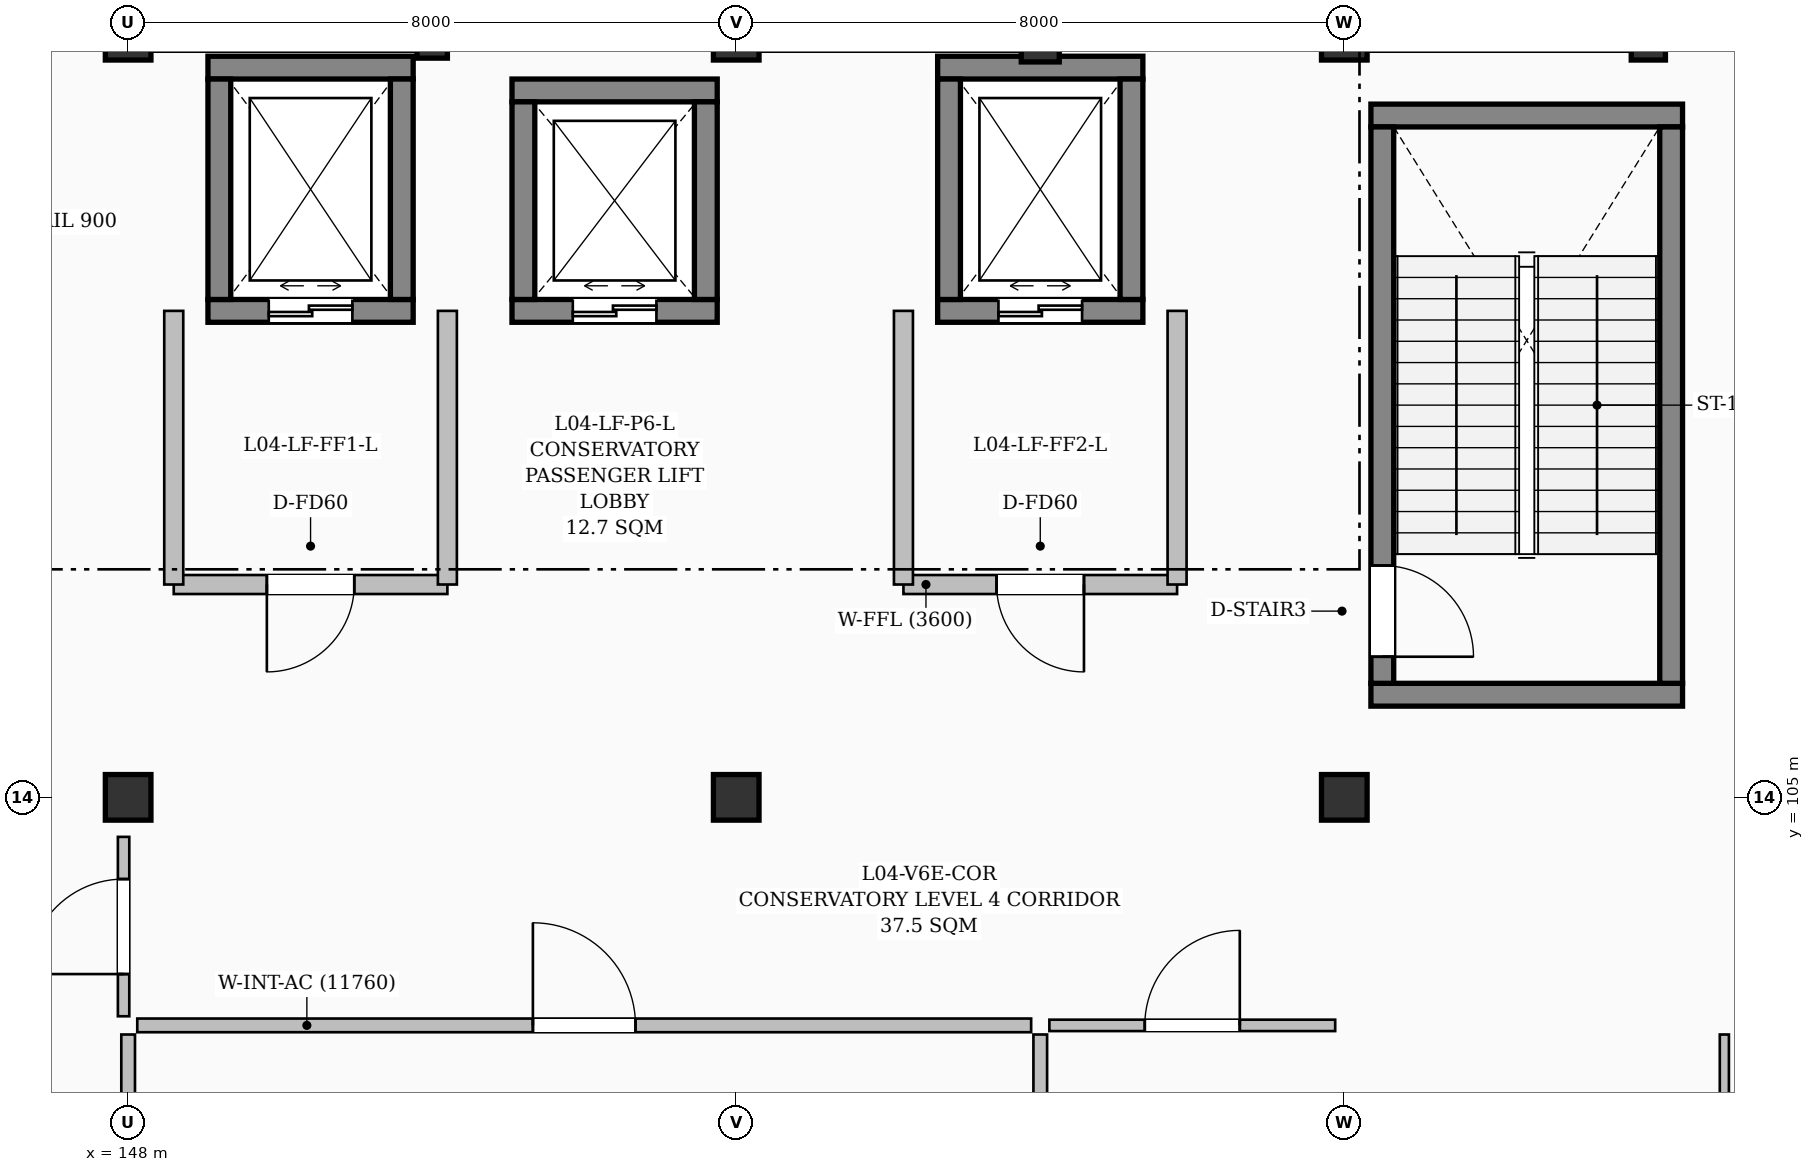
"""IFC4 building model, lengths in metres.
Left out: names, types, materials, properties, quantities, classifications, styles, units other than length and angle.
Written with IfcOpenShell. Run it as: python <this file> out.ifc"""

import sys

from ifc_helpers import new_model, si_unit, direction, frame, frame_2d, origin, origin_2d, place, context, subcontext, project, spatial, rectangle, extrude, element, fill, save


model = new_model("IFC4")
c1 = context("Model", 3, precision=1e-05, world=origin(), true_north=direction((0.0, 1.0)))
c2 = subcontext(c1, "Body", "Model", "MODEL_VIEW")
j1 = project(units=[si_unit("LENGTHUNIT", "METRE"), si_unit("PLANEANGLEUNIT", "RADIAN")], contexts=[c1])
p1 = place(None, origin())
s1 = spatial("IfcSite", under=j1, at=p1, CompositionType="ELEMENT")
p2 = place(p1, origin())
s2 = spatial("IfcBuilding", under=s1, at=p2, CompositionType="ELEMENT")
p3 = place(p2, frame((0.0, 0.0, 18.3)))
s3 = spatial("IfcBuildingStorey", under=s2, at=p3, CompositionType="ELEMENT", Elevation=18.3)
for number, where, z_axis, x_axis in (
    (1, (148.0, 105.0, 0.0), (0.0, 0.0, 1.0), (1.0, 0.0, 0.0)),
    (2, (148.0, 115.0, 0.0), (0.0, 0.0, 1.0), (1.0, 0.0, 0.0)),
):
    element("IfcColumn", number, at=place(p3, frame(where, z_axis=z_axis, x_axis=x_axis)), inside=s3, PredefinedType="COLUMN", context=c2, shape_type="SweptSolid", body=[
        extrude(rectangle(XDim=0.6, YDim=0.6, at=origin_2d()), origin(), (0.0, 0.0, 1.0), 4.5),
    ])
p4 = place(p3, frame((152.0, 115.0, 0.0), z_axis=(0.0, 0.0, 1.0), x_axis=(1.0, 0.0, 0.0)))
e3 = element("IfcColumn", 3, at=p4, inside=s3, PredefinedType="PILASTER", context=c2, shape_type="SweptSolid", body=[
    extrude(rectangle(XDim=0.4, YDim=0.55, at=origin_2d()), origin(), (0.0, 0.0, 1.0), 4.5),
])
for number, where, z_axis, x_axis in (
    (4, (156.0, 105.0, 0.0), (0.0, 0.0, 1.0), (1.0, 0.0, 0.0)),
    (5, (156.0, 115.0, 0.0), (0.0, 0.0, 1.0), (1.0, 0.0, 0.0)),
):
    element("IfcColumn", number, at=place(p3, frame(where, z_axis=z_axis, x_axis=x_axis)), inside=s3, PredefinedType="COLUMN", context=c2, shape_type="SweptSolid", body=[
        extrude(rectangle(XDim=0.6, YDim=0.6, at=origin_2d()), origin(), (0.0, 0.0, 1.0), 4.5),
    ])
p5 = place(p3, frame((160.0, 115.0, 0.0), z_axis=(0.0, 0.0, 1.0), x_axis=(1.0, 0.0, 0.0)))
e6 = element("IfcColumn", 6, at=p5, inside=s3, PredefinedType="PILASTER", context=c2, shape_type="SweptSolid", body=[
    extrude(rectangle(XDim=0.5, YDim=0.65, at=origin_2d()), origin(), (0.0, 0.0, 1.0), 4.5),
])
for number, where, z_axis, x_axis in (
    (7, (164.0, 105.0, 0.0), (0.0, 0.0, 1.0), (1.0, 0.0, 0.0)),
    (8, (164.0, 115.0, 0.0), (0.0, 0.0, 1.0), (1.0, 0.0, 0.0)),
):
    element("IfcColumn", number, at=place(p3, frame(where, z_axis=z_axis, x_axis=x_axis)), inside=s3, PredefinedType="COLUMN", context=c2, shape_type="SweptSolid", body=[
        extrude(rectangle(XDim=0.6, YDim=0.6, at=origin_2d()), origin(), (0.0, 0.0, 1.0), 4.5),
    ])
p6 = place(p3, frame((168.0, 115.0, 0.0), z_axis=(0.0, 0.0, 1.0), x_axis=(1.0, 0.0, 0.0)))
e9 = element("IfcColumn", 9, at=p6, inside=s3, PredefinedType="PILASTER", context=c2, shape_type="SweptSolid", body=[
    extrude(rectangle(XDim=0.45, YDim=0.6, at=origin_2d()), origin(), (0.0, 0.0, 1.0), 4.5),
])
for number, where, z_axis, x_axis in (
    (10, (164.35, 106.35, 0.0), (0.0, 0.0, 1.0), (1.0, 0.0, 0.0)),
    (11, (168.45, 113.97, 0.0), (0.0, 0.0, 1.0), (-1.0, 0.0, 0.0)),
):
    element("IfcWall", number, at=place(p3, frame(where, z_axis=z_axis, x_axis=x_axis)), inside=s3, PredefinedType="SHEAR", context=c2, shape_type="SweptSolid", body=[
        extrude(rectangle(XDim=4.1, YDim=0.3, at=frame_2d((2.05, 0.0))), origin(), (0.0, 0.0, 1.0), 4.2),
    ])
p7 = place(p3, frame((164.5, 113.82, 0.0), z_axis=(0.0, 0.0, 1.0), x_axis=(0.0, -1.0, 0.0)))
e12 = element("IfcWall", 12, at=p7, inside=s3, PredefinedType="SHEAR", context=c2, shape_type="SweptSolid", body=[
    extrude(rectangle(XDim=7.32, YDim=0.3, at=frame_2d((3.66, 0.0))), origin(), (0.0, 0.0, 1.0), 4.2),
])
p8 = place(p7, frame((5.77, 0.0, 0.0)))
e13 = element("IfcOpeningElement", 13, at=p8, cuts=e12, PredefinedType="OPENING", context=c2, shape_type="SweptSolid", body=[
    extrude(rectangle(XDim=1.2, YDim=2.15, at=frame_2d((0.6, 1.075))), frame((0.0, 0.16, 0.0), z_axis=(0.0, -1.0, 0.0), x_axis=(1.0, 0.0, 0.0)), (0.0, 0.0, 1.0), 0.32),
])
p9 = place(p3, frame((168.3, 113.82, 0.0), z_axis=(0.0, 0.0, 1.0), x_axis=(0.0, -1.0, 0.0)))
e14 = element("IfcWall", 14, at=p9, inside=s3, PredefinedType="SHEAR", context=c2, shape_type="SweptSolid", body=[
    extrude(rectangle(XDim=7.32, YDim=0.3, at=frame_2d((3.66, 0.0))), origin(), (0.0, 0.0, 1.0), 4.2),
])
p10 = place(p3, frame((149.05, 111.4, 0.0), z_axis=(0.0, 0.0, 1.0), x_axis=(1.0, 0.0, 0.0)))
e15 = element("IfcWall", 15, at=p10, inside=s3, PredefinedType="SHEAR", context=c2, shape_type="SweptSolid", body=[
    extrude(rectangle(XDim=2.7, YDim=0.3, at=frame_2d((1.35, 0.0))), origin(), (0.0, 0.0, 1.0), 4.2),
])
p11 = place(p10, frame((0.8, 0.0, 0.0)))
e16 = element("IfcOpeningElement", 16, at=p11, cuts=e15, PredefinedType="OPENING", context=c2, shape_type="SweptSolid", body=[
    extrude(rectangle(XDim=1.1, YDim=2.15, at=frame_2d((0.55, 1.075))), frame((0.0, 0.16, 0.0), z_axis=(0.0, -1.0, 0.0), x_axis=(1.0, 0.0, 0.0)), (0.0, 0.0, 1.0), 0.32),
])
p12 = place(p3, frame((151.75, 114.6, 0.0), z_axis=(0.0, 0.0, 1.0), x_axis=(-1.0, 0.0, 0.0)))
e17 = element("IfcWall", 17, at=p12, inside=s3, PredefinedType="SHEAR", context=c2, shape_type="SweptSolid", body=[
    extrude(rectangle(XDim=2.7, YDim=0.3, at=frame_2d((1.35, 0.0))), origin(), (0.0, 0.0, 1.0), 4.2),
])
for number, where, z_axis, x_axis in (
    (18, (149.2, 111.55, 0.0), (0.0, 0.0, 1.0), (0.0, 1.0, 0.0)),
    (19, (151.6, 114.45, 0.0), (0.0, 0.0, 1.0), (0.0, -1.0, 0.0)),
):
    element("IfcWall", number, at=place(p3, frame(where, z_axis=z_axis, x_axis=x_axis)), inside=s3, PredefinedType="SHEAR", context=c2, shape_type="SweptSolid", body=[
        extrude(rectangle(XDim=2.9, YDim=0.3, at=frame_2d((1.45, 0.0))), origin(), (0.0, 0.0, 1.0), 4.2),
    ])
p13 = place(p3, frame((152.2, 107.8, 0.0), z_axis=(0.0, 0.0, 1.0), x_axis=(-1.0, 0.0, 0.0)))
e20 = element("IfcWall", 20, at=p13, inside=s3, PredefinedType="SOLIDWALL", context=c2, shape_type="SweptSolid", body=[
    extrude(rectangle(XDim=3.6, YDim=0.25, at=frame_2d((1.8, 0.0))), origin(), (0.0, 0.0, 1.0), 4.2),
])
p14 = place(p13, frame((1.225, 0.0, 0.0)))
e21 = element("IfcOpeningElement", 21, at=p14, cuts=e20, PredefinedType="OPENING", context=c2, shape_type="SweptSolid", body=[
    extrude(rectangle(XDim=1.15, YDim=2.15, at=frame_2d((0.575, 1.075))), frame((0.0, 0.135, 0.0), z_axis=(0.0, -1.0, 0.0), x_axis=(1.0, 0.0, 0.0)), (0.0, 0.0, 1.0), 0.27),
])
for number, where, z_axis, x_axis in (
    (22, (148.6, 107.8, 0.0), (0.0, 0.0, 1.0), (0.0, 1.0, 0.0)),
    (23, (152.2, 111.4, 0.0), (0.0, 0.0, 1.0), (0.0, -1.0, 0.0)),
):
    element("IfcWall", number, at=place(p3, frame(where, z_axis=z_axis, x_axis=x_axis)), inside=s3, PredefinedType="SOLIDWALL", context=c2, shape_type="SweptSolid", body=[
        extrude(rectangle(XDim=3.6, YDim=0.25, at=frame_2d((1.8, 0.0))), origin(), (0.0, 0.0, 1.0), 4.2),
    ])
p15 = place(p3, frame((158.65, 111.4, 0.0), z_axis=(0.0, 0.0, 1.0), x_axis=(1.0, 0.0, 0.0)))
e24 = element("IfcWall", 24, at=p15, inside=s3, PredefinedType="SHEAR", context=c2, shape_type="SweptSolid", body=[
    extrude(rectangle(XDim=2.7, YDim=0.3, at=frame_2d((1.35, 0.0))), origin(), (0.0, 0.0, 1.0), 4.2),
])
p16 = place(p15, frame((0.8, 0.0, 0.0)))
e25 = element("IfcOpeningElement", 25, at=p16, cuts=e24, PredefinedType="OPENING", context=c2, shape_type="SweptSolid", body=[
    extrude(rectangle(XDim=1.1, YDim=2.15, at=frame_2d((0.55, 1.075))), frame((0.0, 0.16, 0.0), z_axis=(0.0, -1.0, 0.0), x_axis=(1.0, 0.0, 0.0)), (0.0, 0.0, 1.0), 0.32),
])
p17 = place(p3, frame((161.35, 114.6, 0.0), z_axis=(0.0, 0.0, 1.0), x_axis=(-1.0, 0.0, 0.0)))
e26 = element("IfcWall", 26, at=p17, inside=s3, PredefinedType="SHEAR", context=c2, shape_type="SweptSolid", body=[
    extrude(rectangle(XDim=2.7, YDim=0.3, at=frame_2d((1.35, 0.0))), origin(), (0.0, 0.0, 1.0), 4.2),
])
for number, where, z_axis, x_axis in (
    (27, (158.8, 111.55, 0.0), (0.0, 0.0, 1.0), (0.0, 1.0, 0.0)),
    (28, (161.2, 114.45, 0.0), (0.0, 0.0, 1.0), (0.0, -1.0, 0.0)),
):
    element("IfcWall", number, at=place(p3, frame(where, z_axis=z_axis, x_axis=x_axis)), inside=s3, PredefinedType="SHEAR", context=c2, shape_type="SweptSolid", body=[
        extrude(rectangle(XDim=2.9, YDim=0.3, at=frame_2d((1.45, 0.0))), origin(), (0.0, 0.0, 1.0), 4.2),
    ])
p18 = place(p3, frame((161.8, 107.8, 0.0), z_axis=(0.0, 0.0, 1.0), x_axis=(-1.0, 0.0, 0.0)))
e29 = element("IfcWall", 29, at=p18, inside=s3, PredefinedType="SOLIDWALL", context=c2, shape_type="SweptSolid", body=[
    extrude(rectangle(XDim=3.6, YDim=0.25, at=frame_2d((1.8, 0.0))), origin(), (0.0, 0.0, 1.0), 4.2),
])
p19 = place(p18, frame((1.225, 0.0, 0.0)))
e30 = element("IfcOpeningElement", 30, at=p19, cuts=e29, PredefinedType="OPENING", context=c2, shape_type="SweptSolid", body=[
    extrude(rectangle(XDim=1.15, YDim=2.15, at=frame_2d((0.575, 1.075))), frame((0.0, 0.135, 0.0), z_axis=(0.0, -1.0, 0.0), x_axis=(1.0, 0.0, 0.0)), (0.0, 0.0, 1.0), 0.27),
])
for number, where, z_axis, x_axis in (
    (31, (158.2, 107.8, 0.0), (0.0, 0.0, 1.0), (0.0, 1.0, 0.0)),
    (32, (161.8, 111.4, 0.0), (0.0, 0.0, 1.0), (0.0, -1.0, 0.0)),
):
    element("IfcWall", number, at=place(p3, frame(where, z_axis=z_axis, x_axis=x_axis)), inside=s3, PredefinedType="SOLIDWALL", context=c2, shape_type="SweptSolid", body=[
        extrude(rectangle(XDim=3.6, YDim=0.25, at=frame_2d((1.8, 0.0))), origin(), (0.0, 0.0, 1.0), 4.2),
    ])
p20 = place(p3, frame((153.05, 111.4, 0.0), z_axis=(0.0, 0.0, 1.0), x_axis=(1.0, 0.0, 0.0)))
e33 = element("IfcWall", 33, at=p20, inside=s3, PredefinedType="SHEAR", context=c2, shape_type="SweptSolid", body=[
    extrude(rectangle(XDim=2.7, YDim=0.3, at=frame_2d((1.35, 0.0))), origin(), (0.0, 0.0, 1.0), 4.2),
])
p21 = place(p20, frame((0.8, 0.0, 0.0)))
e34 = element("IfcOpeningElement", 34, at=p21, cuts=e33, PredefinedType="OPENING", context=c2, shape_type="SweptSolid", body=[
    extrude(rectangle(XDim=1.1, YDim=2.15, at=frame_2d((0.55, 1.075))), frame((0.0, 0.16, 0.0), z_axis=(0.0, -1.0, 0.0), x_axis=(1.0, 0.0, 0.0)), (0.0, 0.0, 1.0), 0.32),
])
p22 = place(p3, frame((155.75, 114.3, 0.0), z_axis=(0.0, 0.0, 1.0), x_axis=(-1.0, 0.0, 0.0)))
e35 = element("IfcWall", 35, at=p22, inside=s3, PredefinedType="SHEAR", context=c2, shape_type="SweptSolid", body=[
    extrude(rectangle(XDim=2.7, YDim=0.3, at=frame_2d((1.35, 0.0))), origin(), (0.0, 0.0, 1.0), 4.2),
])
for number, where, z_axis, x_axis in (
    (36, (153.2, 111.55, 0.0), (0.0, 0.0, 1.0), (0.0, 1.0, 0.0)),
    (37, (155.6, 114.15, 0.0), (0.0, 0.0, 1.0), (0.0, -1.0, 0.0)),
):
    element("IfcWall", number, at=place(p3, frame(where, z_axis=z_axis, x_axis=x_axis)), inside=s3, PredefinedType="SHEAR", context=c2, shape_type="SweptSolid", body=[
        extrude(rectangle(XDim=2.6, YDim=0.3, at=frame_2d((1.3, 0.0))), origin(), (0.0, 0.0, 1.0), 4.2),
    ])
p23 = place(p3, frame((148.0, 95.32, 0.0), z_axis=(0.0, 0.0, 1.0), x_axis=(0.0, 1.0, 0.0)))
e38 = element("IfcWall", 38, at=p23, inside=s3, PredefinedType="PARTITIONING", context=c2, shape_type="SweptSolid", body=[
    extrude(rectangle(XDim=6.56, YDim=0.18, at=frame_2d((3.28, 0.0))), origin(), (0.0, 0.0, 1.0), 3.335),
])
p24 = place(p23, frame((2.605, 0.0, 0.0)))
e39 = element("IfcOpeningElement", 39, at=p24, cuts=e38, PredefinedType="OPENING", context=c2, shape_type="SweptSolid", body=[
    extrude(rectangle(XDim=1.35, YDim=2.2, at=frame_2d((0.675, 1.1))), frame((0.0, 0.1, 0.0), z_axis=(0.0, -1.0, 0.0), x_axis=(1.0, 0.0, 0.0)), (0.0, 0.0, 1.0), 0.2),
])
p25 = place(p3, frame((147.94, 102.12, 0.0), z_axis=(0.0, 0.0, 1.0), x_axis=(0.0, 1.0, 0.0)))
e40 = element("IfcWall", 40, at=p25, inside=s3, PredefinedType="PARTITIONING", context=c2, shape_type="SweptSolid", body=[
    extrude(rectangle(XDim=2.36, YDim=0.15, at=frame_2d((1.18, 0.0))), origin(), (0.0, 0.0, 1.0), 3.335),
])
p26 = place(p25, frame((0.555, 0.0, 0.0)))
e41 = element("IfcOpeningElement", 41, at=p26, cuts=e40, PredefinedType="OPENING", context=c2, shape_type="SweptSolid", body=[
    extrude(rectangle(XDim=1.25, YDim=2.15, at=frame_2d((0.625, 1.075))), frame((0.0, 0.085, 0.0), z_axis=(0.0, -1.0, 0.0), x_axis=(1.0, 0.0, 0.0)), (0.0, 0.0, 1.0), 0.17),
])
p27 = place(p3, frame((160.0, 95.295, 0.0), z_axis=(0.0, 0.0, 1.0), x_axis=(0.0, 1.0, 0.0)))
e42 = element("IfcWall", 42, at=p27, inside=s3, PredefinedType="PARTITIONING", context=c2, shape_type="SweptSolid", body=[
    extrude(rectangle(XDim=6.585, YDim=0.18, at=frame_2d((3.292, 0.0))), origin(), (0.0, 0.0, 1.0), 4.2),
])
p28 = place(p27, frame((2.617, 0.0, 0.0)))
e43 = element("IfcOpeningElement", 43, at=p28, cuts=e42, PredefinedType="OPENING", context=c2, shape_type="SweptSolid", body=[
    extrude(rectangle(XDim=1.35, YDim=2.2, at=frame_2d((0.675, 1.1))), frame((0.0, 0.1, 0.0), z_axis=(0.0, -1.0, 0.0), x_axis=(1.0, 0.0, 0.0)), (0.0, 0.0, 1.0), 0.2),
])
p29 = place(p3, frame((148.12, 102.0, 0.0), z_axis=(0.0, 0.0, 1.0), x_axis=(1.0, 0.0, 0.0)))
e44 = element("IfcWall", 44, at=p29, inside=s3, PredefinedType="PARTITIONING", context=c2, shape_type="SweptSolid", body=[
    extrude(rectangle(XDim=11.76, YDim=0.18, at=frame_2d((5.88, 0.0))), origin(), (0.0, 0.0, 1.0), 3.785),
])
p30 = place(p29, frame((5.205, 0.0, 0.0)))
e45 = element("IfcOpeningElement", 45, at=p30, cuts=e44, PredefinedType="OPENING", context=c2, shape_type="SweptSolid", body=[
    extrude(rectangle(XDim=1.35, YDim=2.2, at=frame_2d((0.675, 1.1))), frame((0.0, 0.1, 0.0), z_axis=(0.0, -1.0, 0.0), x_axis=(1.0, 0.0, 0.0)), (0.0, 0.0, 1.0), 0.2),
])
p31 = place(p3, frame((160.12, 102.0, 0.0), z_axis=(0.0, 0.0, 1.0), x_axis=(1.0, 0.0, 0.0)))
e46 = element("IfcWall", 46, at=p31, inside=s3, PredefinedType="PARTITIONING", context=c2, shape_type="SweptSolid", body=[
    extrude(rectangle(XDim=3.76, YDim=0.15, at=frame_2d((1.88, 0.0))), origin(), (0.0, 0.0, 1.0), 3.885),
])
p32 = place(p31, frame((1.255, 0.0, 0.0)))
e47 = element("IfcOpeningElement", 47, at=p32, cuts=e46, PredefinedType="OPENING", context=c2, shape_type="SweptSolid", body=[
    extrude(rectangle(XDim=1.25, YDim=2.15, at=frame_2d((0.625, 1.075))), frame((0.0, 0.085, 0.0), z_axis=(0.0, -1.0, 0.0), x_axis=(1.0, 0.0, 0.0)), (0.0, 0.0, 1.0), 0.17),
])
p33 = place(p3, frame((169.0, 98.12, 0.0), z_axis=(0.0, 0.0, 1.0), x_axis=(0.0, 1.0, 0.0)))
e48 = element("IfcWall", 48, at=p33, inside=s3, PredefinedType="PARTITIONING", context=c2, shape_type="SweptSolid", body=[
    extrude(rectangle(XDim=3.76, YDim=0.12, at=frame_2d((1.88, 0.0))), origin(), (0.0, 0.0, 1.0), 4.2),
])
p34 = place(p33, frame((1.405, 0.0, 0.0)))
e49 = element("IfcOpeningElement", 49, at=p34, cuts=e48, PredefinedType="OPENING", context=c2, shape_type="SweptSolid", body=[
    extrude(rectangle(XDim=0.95, YDim=2.1, at=frame_2d((0.475, 1.05))), frame((0.0, 0.07, 0.0), z_axis=(0.0, -1.0, 0.0), x_axis=(1.0, 0.0, 0.0)), (0.0, 0.0, 1.0), 0.14),
])
p35 = place(p8, origin())
e50 = element("IfcDoor", 50, at=p35, inside=s3, OperationType="SINGLE_SWING_RIGHT", PredefinedType="DOOR", context=c2, shape_type="SweptSolid", body=[
    extrude(rectangle(XDim=1.2, YDim=2.15, at=frame_2d((0.6, 1.075))), frame((0.0, 0.025, 0.0), z_axis=(0.0, -1.0, 0.0), x_axis=(1.0, 0.0, 0.0)), (0.0, 0.0, 1.0), 0.05),
])
fill(e13, e50)
p36 = place(p11, origin())
e51 = element("IfcDoor", 51, at=p36, inside=s3, OperationType="DOUBLE_DOOR_SLIDING", PredefinedType="DOOR", context=c2, shape_type="SweptSolid", body=[
    extrude(rectangle(XDim=1.1, YDim=2.15, at=frame_2d((0.55, 1.075))), frame((0.0, 0.025, 0.0), z_axis=(0.0, -1.0, 0.0), x_axis=(1.0, 0.0, 0.0)), (0.0, 0.0, 1.0), 0.05),
])
fill(e16, e51)
p37 = place(p14, origin())
e52 = element("IfcDoor", 52, at=p37, inside=s3, OperationType="SINGLE_SWING_RIGHT", PredefinedType="DOOR", context=c2, shape_type="SweptSolid", body=[
    extrude(rectangle(XDim=1.15, YDim=2.15, at=frame_2d((0.575, 1.075))), frame((0.0, 0.025, 0.0), z_axis=(0.0, -1.0, 0.0), x_axis=(1.0, 0.0, 0.0)), (0.0, 0.0, 1.0), 0.05),
])
fill(e21, e52)
p38 = place(p16, origin())
e53 = element("IfcDoor", 53, at=p38, inside=s3, OperationType="DOUBLE_DOOR_SLIDING", PredefinedType="DOOR", context=c2, shape_type="SweptSolid", body=[
    extrude(rectangle(XDim=1.1, YDim=2.15, at=frame_2d((0.55, 1.075))), frame((0.0, 0.025, 0.0), z_axis=(0.0, -1.0, 0.0), x_axis=(1.0, 0.0, 0.0)), (0.0, 0.0, 1.0), 0.05),
])
fill(e25, e53)
p39 = place(p19, origin())
e54 = element("IfcDoor", 54, at=p39, inside=s3, OperationType="SINGLE_SWING_LEFT", PredefinedType="DOOR", context=c2, shape_type="SweptSolid", body=[
    extrude(rectangle(XDim=1.15, YDim=2.15, at=frame_2d((0.575, 1.075))), frame((0.0, 0.025, 0.0), z_axis=(0.0, -1.0, 0.0), x_axis=(1.0, 0.0, 0.0)), (0.0, 0.0, 1.0), 0.05),
])
fill(e30, e54)
p40 = place(p21, origin())
e55 = element("IfcDoor", 55, at=p40, inside=s3, OperationType="DOUBLE_DOOR_SLIDING", PredefinedType="DOOR", context=c2, shape_type="SweptSolid", body=[
    extrude(rectangle(XDim=1.1, YDim=2.15, at=frame_2d((0.55, 1.075))), frame((0.0, 0.025, 0.0), z_axis=(0.0, -1.0, 0.0), x_axis=(1.0, 0.0, 0.0)), (0.0, 0.0, 1.0), 0.05),
])
fill(e34, e55)
p41 = place(p26, origin())
e56 = element("IfcDoor", 56, at=p41, inside=s3, OperationType="SINGLE_SWING_LEFT", PredefinedType="DOOR", context=c2, shape_type="SweptSolid", body=[
    extrude(rectangle(XDim=1.25, YDim=2.15, at=frame_2d((0.625, 1.075))), frame((0.0, 0.025, 0.0), z_axis=(0.0, -1.0, 0.0), x_axis=(1.0, 0.0, 0.0)), (0.0, 0.0, 1.0), 0.05),
])
fill(e41, e56)
p42 = place(p30, origin())
e57 = element("IfcDoor", 57, at=p42, inside=s3, OperationType="SINGLE_SWING_LEFT", PredefinedType="DOOR", context=c2, shape_type="SweptSolid", body=[
    extrude(rectangle(XDim=1.35, YDim=2.2, at=frame_2d((0.675, 1.1))), frame((0.0, 0.025, 0.0), z_axis=(0.0, -1.0, 0.0), x_axis=(1.0, 0.0, 0.0)), (0.0, 0.0, 1.0), 0.05),
])
fill(e45, e57)
p43 = place(p32, origin())
e58 = element("IfcDoor", 58, at=p43, inside=s3, OperationType="SINGLE_SWING_RIGHT", PredefinedType="DOOR", context=c2, shape_type="SweptSolid", body=[
    extrude(rectangle(XDim=1.25, YDim=2.15, at=frame_2d((0.625, 1.075))), frame((0.0, 0.025, 0.0), z_axis=(0.0, -1.0, 0.0), x_axis=(1.0, 0.0, 0.0)), (0.0, 0.0, 1.0), 0.05),
])
fill(e47, e58)
save(model, sys.argv[1])
